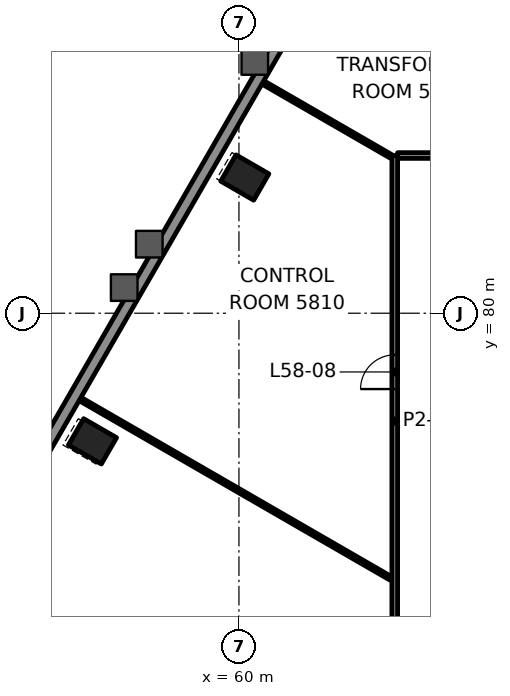
"""IFC4 building model, lengths in metres.
Left out: names, types, materials, properties, quantities, classifications, styles, units other than length and angle.
Written with IfcOpenShell. Run it as: python <this file> out.ifc"""

import sys

from ifc_helpers import new_model, si_unit, direction, frame, frame_2d, origin, origin_2d, place, context, subcontext, project, spatial, rectangle, hollow_rectangle, extrude, element, fill, save


model = new_model("IFC4")
c1 = context("Model", 3, precision=1e-05, world=origin(), true_north=direction((0.0, 1.0)))
c2 = subcontext(c1, "Body", "Model", "MODEL_VIEW")
j1 = project(units=[si_unit("LENGTHUNIT", "METRE"), si_unit("PLANEANGLEUNIT", "RADIAN")], contexts=[c1])
p1 = place(None, origin())
s1 = spatial("IfcSite", under=j1, at=p1, CompositionType="ELEMENT")
p2 = place(p1, origin())
s2 = spatial("IfcBuilding", under=s1, at=p2, CompositionType="ELEMENT")
p3 = place(p2, frame((0.0, 0.0, 247.6)))
s3 = spatial("IfcBuildingStorey", under=s2, at=p3, CompositionType="ELEMENT", Elevation=247.6)
for number, where, z_axis, x_axis in (
    (1, (60.155, 83.571, -0.0), (0.0, 0.0, 1.0), (-0.5, -0.866, 0.0)),
    (2, (56.146, 76.628, -0.0), (0.0, 0.0, 1.0), (-0.5, -0.866, 0.0)),
):
    element("IfcColumn", number, at=place(p3, frame(where, z_axis=z_axis, x_axis=x_axis)), inside=s3, PredefinedType="COLUMN", context=c2, shape_type="SweptSolid", body=[
        extrude(hollow_rectangle(XDim=0.8, YDim=1.0, WallThickness=0.05, at=origin_2d()), origin(), (0.0, 0.0, 1.0), 4.5),
    ])
p4 = place(p3, frame((64.176, 84.15, 0.0), z_axis=(0.0, 0.0, 1.0), x_axis=(1.0, 0.0, 0.0)))
e3 = element("IfcWall", 3, at=p4, inside=s3, PredefinedType="PARTITIONING", context=c2, shape_type="SweptSolid", body=[
    extrude(rectangle(XDim=7.625, YDim=0.15, at=frame_2d((3.812, 0.0))), origin(), (0.0, 0.0, 1.0), 3.447),
])
p5 = place(p4, frame((3.362, 0.0, 0.0)))
e4 = element("IfcOpeningElement", 4, at=p5, cuts=e3, PredefinedType="OPENING", context=c2, shape_type="SweptSolid", body=[
    extrude(rectangle(XDim=0.9, YDim=2.1, at=frame_2d((0.45, 1.05))), frame((0.0, 0.085, 0.0), z_axis=(0.0, -1.0, 0.0), x_axis=(1.0, 0.0, 0.0)), (0.0, 0.0, 1.0), 0.17),
])
p6 = place(p3, frame((64.1, 70.179, 0.0), z_axis=(0.0, 0.0, 1.0), x_axis=(0.0, 1.0, 0.0)))
e5 = element("IfcWall", 5, at=p6, inside=s3, PredefinedType="PARTITIONING", context=c2, shape_type="SweptSolid", body=[
    extrude(rectangle(XDim=13.97, YDim=0.15, at=frame_2d((6.985, 0.0))), origin(), (0.0, 0.0, 1.0), 3.45),
])
p7 = place(p6, frame((7.825, 0.0, 0.0)))
e6 = element("IfcOpeningElement", 6, at=p7, cuts=e5, PredefinedType="OPENING", context=c2, shape_type="SweptSolid", body=[
    extrude(rectangle(XDim=0.9, YDim=2.1, at=frame_2d((0.45, 1.05))), frame((0.0, 0.085, 0.0), z_axis=(0.0, -1.0, 0.0), x_axis=(1.0, 0.0, 0.0)), (0.0, 0.0, 1.0), 0.17),
])
p8 = place(p3, frame((64.008, 84.124, 0.0), z_axis=(0.0, 0.0, 1.0), x_axis=(-0.866018749026, 0.500011526203, 0.0)))
e7 = element("IfcWall", 7, at=p8, inside=s3, PredefinedType="PARTITIONING", context=c2, shape_type="SweptSolid", body=[
    extrude(rectangle(XDim=4.021, YDim=0.1, at=frame_2d((2.01, 0.0))), origin(), (0.0, 0.0, 1.0), 3.372),
])
p9 = place(p3, frame((63.999, 73.02, 0.0), z_axis=(0.0, 0.0, 1.0), x_axis=(-0.866024489559, 0.500001583482, 0.0)))
e8 = element("IfcWall", 8, at=p9, inside=s3, PredefinedType="PARTITIONING", context=c2, shape_type="SweptSolid", body=[
    extrude(rectangle(XDim=9.565, YDim=0.1, at=frame_2d((4.782, 0.0))), origin(), (0.0, 0.0, 1.0), 3.372),
])
p10 = place(p3, frame((71.348, 104.939, 0.0), z_axis=(0.0, 0.0, 1.0), x_axis=(-0.500001140025, -0.866024745589, 0.0)))
e9 = element("IfcWall", 9, at=p10, inside=s3, PredefinedType="SOLIDWALL", context=c2, shape_type="SweptSolid", body=[
    extrude(rectangle(XDim=48.204, YDim=0.3, at=frame_2d((24.102, 0.0))), origin(), (0.0, 0.0, 1.0), 4.05),
])
p11 = place(p7, origin())
e10 = element("IfcDoor", 10, at=p11, inside=s3, OperationType="SINGLE_SWING_LEFT", PredefinedType="DOOR", context=c2, shape_type="SweptSolid", body=[
    extrude(rectangle(XDim=0.9, YDim=2.1, at=frame_2d((0.45, 1.05))), frame((0.0, 0.025, 0.0), z_axis=(0.0, -1.0, 0.0), x_axis=(1.0, 0.0, 0.0)), (0.0, 0.0, 1.0), 0.05),
])
fill(e6, e10)
save(model, sys.argv[1])
